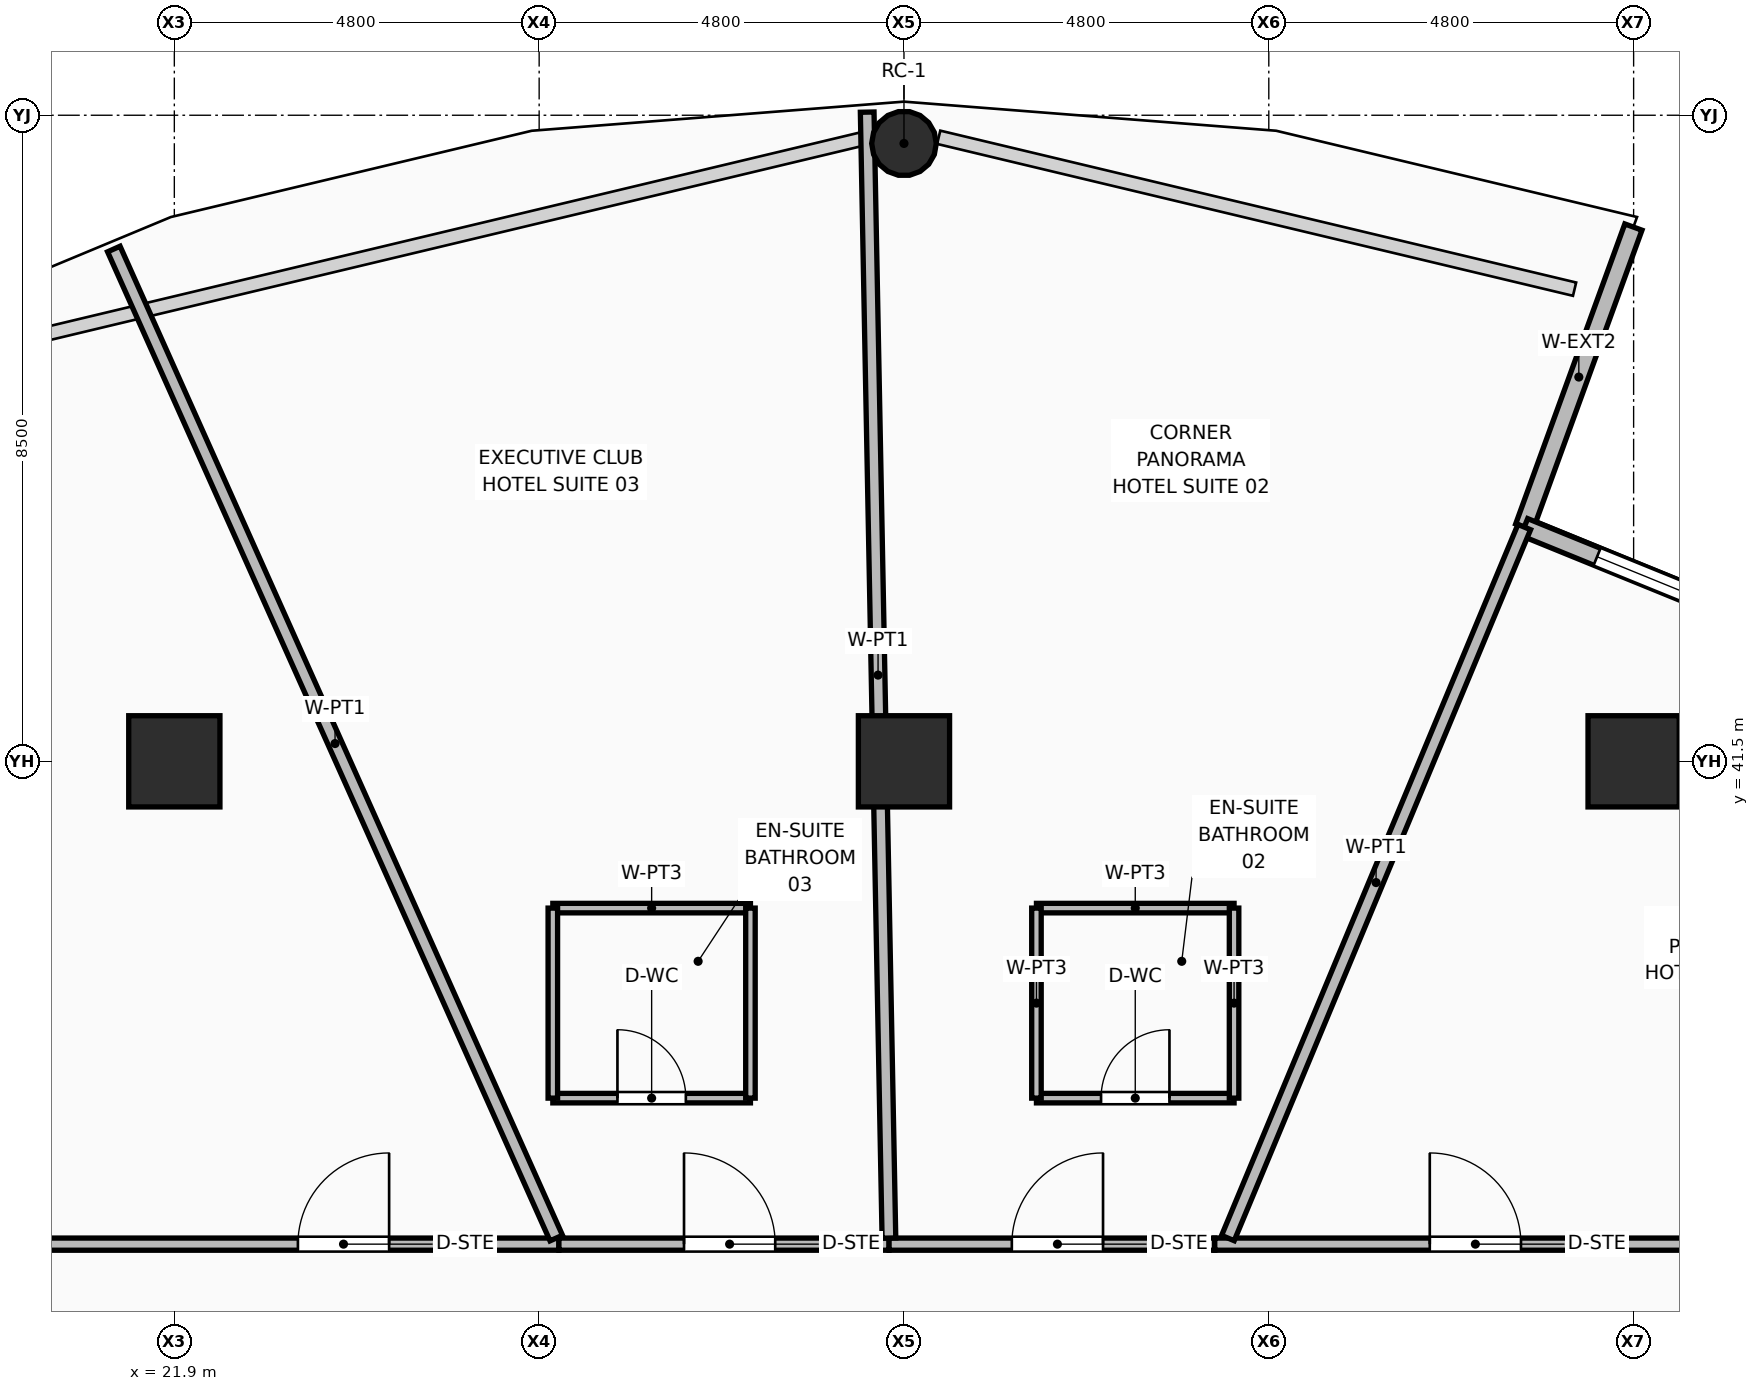
"""IFC4 building model, lengths in metres.
Left out: names, types, materials, properties, quantities, classifications, styles, units other than length and angle.
Written with IfcOpenShell. Run it as: python <this file> out.ifc"""

import sys

from ifc_helpers import new_model, si_unit, direction, frame, frame_2d, origin, origin_2d, place, context, subcontext, project, spatial, rectangle, hollow_rectangle, hollow_circle, extrude, element, fill, save


model = new_model("IFC4")
c1 = context("Model", 3, precision=1e-05, world=origin(), true_north=direction((0.0, 1.0)))
c2 = subcontext(c1, "Body", "Model", "MODEL_VIEW")
j1 = project(units=[si_unit("LENGTHUNIT", "METRE"), si_unit("PLANEANGLEUNIT", "RADIAN")], contexts=[c1])
p1 = place(None, origin())
s1 = spatial("IfcSite", under=j1, at=p1, CompositionType="ELEMENT")
p2 = place(p1, origin())
s2 = spatial("IfcBuilding", under=s1, at=p2, CompositionType="ELEMENT")
p3 = place(p2, frame((0.0, 0.0, 72.0)))
s3 = spatial("IfcBuildingStorey", under=s2, at=p3, CompositionType="ELEMENT", Elevation=72.0)
for number, where, z_axis, x_axis in (
    (1, (21.9, 41.5, 0.0), (0.0, 0.0, 1.0), (1.0, 0.0, 0.0)),
    (2, (31.5, 41.5, 0.0), (0.0, 0.0, 1.0), (1.0, 0.0, 0.0)),
    (3, (41.1, 41.5, 0.0), (0.0, 0.0, 1.0), (1.0, 0.0, 0.0)),
):
    element("IfcColumn", number, at=place(p3, frame(where, z_axis=z_axis, x_axis=x_axis)), inside=s3, PredefinedType="COLUMN", context=c2, shape_type="SweptSolid", body=[
        extrude(hollow_rectangle(XDim=1.2, YDim=1.2, WallThickness=0.045, at=origin_2d()), origin(), (0.0, 0.0, 1.0), 3.75),
    ])
p4 = place(p3, frame((31.5, 49.629, 0.0), z_axis=(0.0, 0.0, 1.0), x_axis=(1.0, 0.0, 0.0)))
e4 = element("IfcColumn", 4, at=p4, inside=s3, PredefinedType="COLUMN", context=c2, shape_type="SweptSolid", body=[
    extrude(hollow_circle(Radius=0.425, WallThickness=0.04, at=origin_2d()), origin(), (0.0, 0.0, 1.0), 3.57),
])
p5 = place(p3, frame((39.661, 44.582, 0.0), z_axis=(0.0, 0.0, 1.0), x_axis=(0.341901740091, 0.939735707592, 0.0)))
e5 = element("IfcWall", 5, at=p5, inside=s3, PredefinedType="SOLIDWALL", context=c2, shape_type="SweptSolid", body=[
    extrude(rectangle(XDim=4.2, YDim=0.24, at=frame_2d((2.1, 0.0))), origin(), (0.0, 0.0, 1.0), 3.57),
])
p6 = place(p3, frame((43.43, 43.047, 0.0), z_axis=(0.0, 0.0, 1.0), x_axis=(-0.926145919151, 0.377165396664, 0.0)))
e6 = element("IfcWall", 6, at=p6, inside=s3, PredefinedType="SOLIDWALL", context=c2, shape_type="SweptSolid", body=[
    extrude(rectangle(XDim=4.07, YDim=0.24, at=frame_2d((2.035, 0.0))), origin(), (0.0, 0.0, 1.0), 3.57),
])
p7 = place(p6, frame((1.035, 0.0, 0.85)))
e7 = element("IfcOpeningElement", 7, at=p7, cuts=e6, PredefinedType="OPENING", context=c2, shape_type="SweptSolid", body=[
    extrude(rectangle(XDim=2.0, YDim=2.4, at=frame_2d((1.0, 1.2))), frame((0.0, 0.13, 0.0), z_axis=(0.0, -1.0, 0.0), x_axis=(1.0, 0.0, 0.0)), (0.0, 0.0, 1.0), 0.26),
])
p8 = place(p3, frame((19.219, 35.148, 0.0), z_axis=(0.0, 0.0, 1.0), x_axis=(1.0, 0.0, 0.0)))
e8 = element("IfcWall", 8, at=p8, inside=s3, PredefinedType="PARTITIONING", context=c2, shape_type="SweptSolid", body=[
    extrude(rectangle(XDim=7.741, YDim=0.16, at=frame_2d((3.871, 0.0))), origin(), (0.0, 0.0, 1.0), 2.928),
])
p9 = place(p8, frame((4.307, 0.0, 0.0)))
e9 = element("IfcOpeningElement", 9, at=p9, cuts=e8, PredefinedType="OPENING", context=c2, shape_type="SweptSolid", body=[
    extrude(rectangle(XDim=1.2, YDim=2.1, at=frame_2d((0.6, 1.05))), frame((0.0, 0.09, 0.0), z_axis=(0.0, -1.0, 0.0), x_axis=(1.0, 0.0, 0.0)), (0.0, 0.0, 1.0), 0.18),
])
p10 = place(p3, frame((26.96, 35.148, 0.0), z_axis=(0.0, 0.0, 1.0), x_axis=(1.0, 0.0, 0.0)))
e10 = element("IfcWall", 10, at=p10, inside=s3, PredefinedType="PARTITIONING", context=c2, shape_type="SweptSolid", body=[
    extrude(rectangle(XDim=4.344, YDim=0.16, at=frame_2d((2.172, 0.0))), origin(), (0.0, 0.0, 1.0), 2.928),
])
p11 = place(p10, frame((1.646, 0.0, 0.0)))
e11 = element("IfcOpeningElement", 11, at=p11, cuts=e10, PredefinedType="OPENING", context=c2, shape_type="SweptSolid", body=[
    extrude(rectangle(XDim=1.2, YDim=2.1, at=frame_2d((0.6, 1.05))), frame((0.0, 0.09, 0.0), z_axis=(0.0, -1.0, 0.0), x_axis=(1.0, 0.0, 0.0)), (0.0, 0.0, 1.0), 0.18),
])
p12 = place(p3, frame((31.304, 35.148, 0.0), z_axis=(0.0, 0.0, 1.0), x_axis=(1.0, 0.0, 0.0)))
e12 = element("IfcWall", 12, at=p12, inside=s3, PredefinedType="PARTITIONING", context=c2, shape_type="SweptSolid", body=[
    extrude(rectangle(XDim=4.285, YDim=0.16, at=frame_2d((2.143, 0.0))), origin(), (0.0, 0.0, 1.0), 2.928),
])
p13 = place(p12, frame((1.615, 0.0, 0.0)))
e13 = element("IfcOpeningElement", 13, at=p13, cuts=e12, PredefinedType="OPENING", context=c2, shape_type="SweptSolid", body=[
    extrude(rectangle(XDim=1.2, YDim=2.1, at=frame_2d((0.6, 1.05))), frame((0.0, 0.09, 0.0), z_axis=(0.0, -1.0, 0.0), x_axis=(1.0, 0.0, 0.0)), (0.0, 0.0, 1.0), 0.18),
])
p14 = place(p3, frame((35.589, 35.148, 0.0), z_axis=(0.0, 0.0, 1.0), x_axis=(1.0, 0.0, 0.0)))
e14 = element("IfcWall", 14, at=p14, inside=s3, PredefinedType="PARTITIONING", context=c2, shape_type="SweptSolid", body=[
    extrude(rectangle(XDim=8.192, YDim=0.16, at=frame_2d((4.096, 0.0))), origin(), (0.0, 0.0, 1.0), 2.928),
])
p15 = place(p14, frame((2.829, 0.0, 0.0)))
e15 = element("IfcOpeningElement", 15, at=p15, cuts=e14, PredefinedType="OPENING", context=c2, shape_type="SweptSolid", body=[
    extrude(rectangle(XDim=1.2, YDim=2.1, at=frame_2d((0.6, 1.05))), frame((0.0, 0.09, 0.0), z_axis=(0.0, -1.0, 0.0), x_axis=(1.0, 0.0, 0.0)), (0.0, 0.0, 1.0), 0.18),
])
p16 = place(p3, frame((35.762, 35.228, 0.0), z_axis=(0.0, 0.0, 1.0), x_axis=(0.384735124205, 0.923027022466, 0.0)))
e16 = element("IfcWall", 16, at=p16, inside=s3, PredefinedType="PARTITIONING", context=c2, shape_type="SweptSolid", body=[
    extrude(rectangle(XDim=10.134, YDim=0.18, at=frame_2d((5.067, 0.0))), origin(), (0.0, 0.0, 1.0), 3.55),
])
p17 = place(p3, frame((31.302, 35.228, 0.0), z_axis=(0.0, 0.0, 1.0), x_axis=(-0.019296271402, 0.999813809622, 0.0)))
e17 = element("IfcWall", 17, at=p17, inside=s3, PredefinedType="PARTITIONING", context=c2, shape_type="SweptSolid", body=[
    extrude(rectangle(XDim=14.816, YDim=0.18, at=frame_2d((7.408, 0.0))), origin(), (0.0, 0.0, 1.0), 2.775),
])
p18 = place(p3, frame((26.925, 35.228, 0.0), z_axis=(0.0, 0.0, 1.0), x_axis=(-0.4083604268, 0.912820772016, 0.0)))
e18 = element("IfcWall", 18, at=p18, inside=s3, PredefinedType="PARTITIONING", context=c2, shape_type="SweptSolid", body=[
    extrude(rectangle(XDim=14.255, YDim=0.18, at=frame_2d((7.127, 0.0))), origin(), (0.0, 0.0, 1.0), 2.775),
])
p19 = place(p3, frame((33.243, 37.069, 0.0), z_axis=(0.0, 0.0, 1.0), x_axis=(1.0, 0.0, 0.0)))
e19 = element("IfcWall", 19, at=p19, inside=s3, PredefinedType="PARTITIONING", context=c2, shape_type="SweptSolid", body=[
    extrude(rectangle(XDim=2.6, YDim=0.125, at=frame_2d((1.3, 0.0))), origin(), (0.0, 0.0, 1.0), 3.55),
])
p20 = place(p19, frame((0.85, 0.0, 0.0)))
e20 = element("IfcOpeningElement", 20, at=p20, cuts=e19, PredefinedType="OPENING", context=c2, shape_type="SweptSolid", body=[
    extrude(rectangle(XDim=0.9, YDim=2.1, at=frame_2d((0.45, 1.05))), frame((0.0, 0.073, 0.0), z_axis=(0.0, -1.0, 0.0), x_axis=(1.0, 0.0, 0.0)), (0.0, 0.0, 1.0), 0.145),
])
p21 = place(p3, frame((33.243, 39.569, 0.0), z_axis=(0.0, 0.0, 1.0), x_axis=(1.0, 0.0, 0.0)))
e21 = element("IfcWall", 21, at=p21, inside=s3, PredefinedType="PARTITIONING", context=c2, shape_type="SweptSolid", body=[
    extrude(rectangle(XDim=2.6, YDim=0.125, at=frame_2d((1.3, 0.0))), origin(), (0.0, 0.0, 1.0), 3.55),
])
for number, where, z_axis, x_axis in (
    (22, (33.243, 37.069, 0.0), (0.0, 0.0, 1.0), (0.0, 1.0, 0.0)),
    (23, (35.843, 37.069, 0.0), (0.0, 0.0, 1.0), (0.0, 1.0, 0.0)),
):
    element("IfcWall", number, at=place(p3, frame(where, z_axis=z_axis, x_axis=x_axis)), inside=s3, PredefinedType="PARTITIONING", context=c2, shape_type="SweptSolid", body=[
        extrude(rectangle(XDim=2.5, YDim=0.125, at=frame_2d((1.25, 0.0))), origin(), (0.0, 0.0, 1.0), 3.55),
    ])
p22 = place(p3, frame((26.88, 37.069, 0.0), z_axis=(0.0, 0.0, 1.0), x_axis=(1.0, 0.0, 0.0)))
e24 = element("IfcWall", 24, at=p22, inside=s3, PredefinedType="PARTITIONING", context=c2, shape_type="SweptSolid", body=[
    extrude(rectangle(XDim=2.6, YDim=0.125, at=frame_2d((1.3, 0.0))), origin(), (0.0, 0.0, 1.0), 3.55),
])
p23 = place(p22, frame((0.85, 0.0, 0.0)))
e25 = element("IfcOpeningElement", 25, at=p23, cuts=e24, PredefinedType="OPENING", context=c2, shape_type="SweptSolid", body=[
    extrude(rectangle(XDim=0.9, YDim=2.1, at=frame_2d((0.45, 1.05))), frame((0.0, 0.073, 0.0), z_axis=(0.0, -1.0, 0.0), x_axis=(1.0, 0.0, 0.0)), (0.0, 0.0, 1.0), 0.145),
])
p24 = place(p3, frame((26.88, 39.569, 0.0), z_axis=(0.0, 0.0, 1.0), x_axis=(1.0, 0.0, 0.0)))
e26 = element("IfcWall", 26, at=p24, inside=s3, PredefinedType="PARTITIONING", context=c2, shape_type="SweptSolid", body=[
    extrude(rectangle(XDim=2.6, YDim=0.125, at=frame_2d((1.3, 0.0))), origin(), (0.0, 0.0, 1.0), 3.55),
])
for number, where, z_axis, x_axis in (
    (27, (26.88, 37.069, 0.0), (0.0, 0.0, 1.0), (0.0, 1.0, 0.0)),
    (28, (29.48, 37.069, 0.0), (0.0, 0.0, 1.0), (0.0, 1.0, 0.0)),
):
    element("IfcWall", number, at=place(p3, frame(where, z_axis=z_axis, x_axis=x_axis)), inside=s3, PredefinedType="PARTITIONING", context=c2, shape_type="SweptSolid", body=[
        extrude(rectangle(XDim=2.5, YDim=0.125, at=frame_2d((1.25, 0.0))), origin(), (0.0, 0.0, 1.0), 3.55),
    ])
p25 = place(p7, origin())
e29 = element("IfcWindow", 29, at=p25, inside=s3, PartitioningType="SINGLE_PANEL", PredefinedType="WINDOW", context=c2, shape_type="SweptSolid", body=[
    extrude(rectangle(XDim=2.0, YDim=2.4, at=frame_2d((1.0, 1.2))), frame((0.0, 0.03, 0.0), z_axis=(0.0, -1.0, 0.0), x_axis=(1.0, 0.0, 0.0)), (0.0, 0.0, 1.0), 0.06),
])
fill(e7, e29)
p26 = place(p15, origin())
e30 = element("IfcDoor", 30, at=p26, inside=s3, OperationType="SINGLE_SWING_LEFT", PredefinedType="DOOR", context=c2, shape_type="SweptSolid", body=[
    extrude(rectangle(XDim=1.2, YDim=2.1, at=frame_2d((0.6, 1.05))), frame((0.0, 0.025, 0.0), z_axis=(0.0, -1.0, 0.0), x_axis=(1.0, 0.0, 0.0)), (0.0, 0.0, 1.0), 0.05),
])
fill(e15, e30)
p27 = place(p20, origin())
e31 = element("IfcDoor", 31, at=p27, inside=s3, OperationType="SINGLE_SWING_RIGHT", PredefinedType="DOOR", context=c2, shape_type="SweptSolid", body=[
    extrude(rectangle(XDim=0.9, YDim=2.1, at=frame_2d((0.45, 1.05))), frame((0.0, 0.025, 0.0), z_axis=(0.0, -1.0, 0.0), x_axis=(1.0, 0.0, 0.0)), (0.0, 0.0, 1.0), 0.05),
])
fill(e20, e31)
p28 = place(p13, origin())
e32 = element("IfcDoor", 32, at=p28, inside=s3, OperationType="SINGLE_SWING_RIGHT", PredefinedType="DOOR", context=c2, shape_type="SweptSolid", body=[
    extrude(rectangle(XDim=1.2, YDim=2.1, at=frame_2d((0.6, 1.05))), frame((0.0, 0.025, 0.0), z_axis=(0.0, -1.0, 0.0), x_axis=(1.0, 0.0, 0.0)), (0.0, 0.0, 1.0), 0.05),
])
fill(e13, e32)
p29 = place(p23, origin())
e33 = element("IfcDoor", 33, at=p29, inside=s3, OperationType="SINGLE_SWING_LEFT", PredefinedType="DOOR", context=c2, shape_type="SweptSolid", body=[
    extrude(rectangle(XDim=0.9, YDim=2.1, at=frame_2d((0.45, 1.05))), frame((0.0, 0.025, 0.0), z_axis=(0.0, -1.0, 0.0), x_axis=(1.0, 0.0, 0.0)), (0.0, 0.0, 1.0), 0.05),
])
fill(e25, e33)
p30 = place(p11, origin())
e34 = element("IfcDoor", 34, at=p30, inside=s3, OperationType="SINGLE_SWING_LEFT", PredefinedType="DOOR", context=c2, shape_type="SweptSolid", body=[
    extrude(rectangle(XDim=1.2, YDim=2.1, at=frame_2d((0.6, 1.05))), frame((0.0, 0.025, 0.0), z_axis=(0.0, -1.0, 0.0), x_axis=(1.0, 0.0, 0.0)), (0.0, 0.0, 1.0), 0.05),
])
fill(e11, e34)
p31 = place(p9, origin())
e35 = element("IfcDoor", 35, at=p31, inside=s3, OperationType="SINGLE_SWING_RIGHT", PredefinedType="DOOR", context=c2, shape_type="SweptSolid", body=[
    extrude(rectangle(XDim=1.2, YDim=2.1, at=frame_2d((0.6, 1.05))), frame((0.0, 0.025, 0.0), z_axis=(0.0, -1.0, 0.0), x_axis=(1.0, 0.0, 0.0)), (0.0, 0.0, 1.0), 0.05),
])
fill(e9, e35)
save(model, sys.argv[1])
